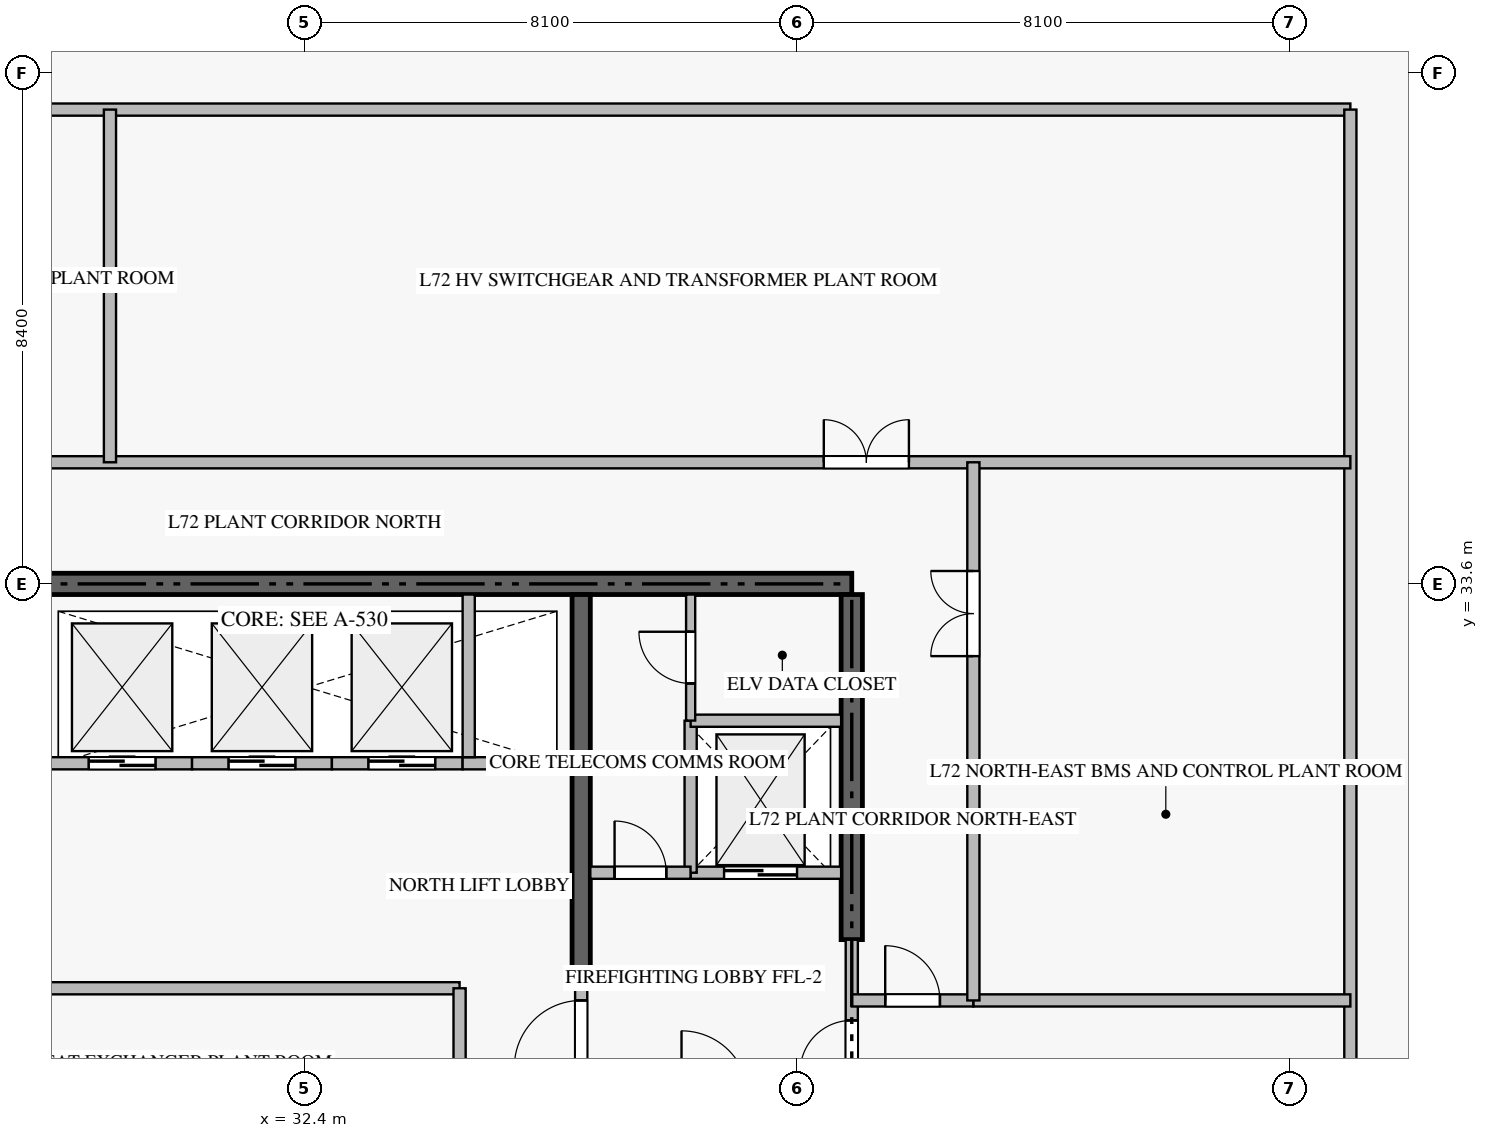
"""IFC4 building model, lengths in metres.
Left out: names, types, materials, properties, quantities, classifications, styles, units other than length and angle.
Written with IfcOpenShell. Run it as: python <this file> out.ifc"""

import sys

from ifc_helpers import new_model, si_unit, direction, frame, frame_2d, origin, place, context, subcontext, project, spatial, rectangle, extrude, source, transform, mapped, element, fill, save


model = new_model("IFC4")
c1 = context("Model", 3, precision=1e-05, world=origin(), true_north=direction((0.0, 1.0)))
c2 = subcontext(c1, "Body", "Model", "MODEL_VIEW")
j1 = project(units=[si_unit("LENGTHUNIT", "METRE"), si_unit("PLANEANGLEUNIT", "RADIAN")], contexts=[c1])
p1 = place(None, origin())
s1 = spatial("IfcSite", under=j1, at=p1, CompositionType="ELEMENT")
p2 = place(p1, origin())
s2 = spatial("IfcBuilding", under=s1, at=p2, CompositionType="ELEMENT")
p3 = place(p2, frame((0.0, 0.0, 287.45)))
s3 = spatial("IfcBuildingStorey", under=s2, at=p3, CompositionType="ELEMENT", Elevation=287.45)
p4 = place(p3, frame((41.4, 33.6, -0.44), z_axis=(0.0, 0.0, 1.0), x_axis=(-1.0, 0.0, 0.0)))
e1 = element("IfcWall", 1, at=p4, inside=s3, PredefinedType="SHEAR", context=c2, shape_type="SweptSolid", body=[
    extrude(rectangle(XDim=18.0, YDim=0.35, at=frame_2d((9.0, 0.0))), origin(), (0.0, 0.0, 1.0), 6.178),
])
p5 = place(p3, frame((41.4, 27.75, -0.44), z_axis=(0.0, 0.0, 1.0), x_axis=(0.0, 1.0, 0.0)))
e2 = element("IfcWall", 2, at=p5, inside=s3, PredefinedType="SHEAR", context=c2, shape_type="SweptSolid", body=[
    extrude(rectangle(XDim=5.675, YDim=0.35, at=frame_2d((2.837, 0.0))), origin(), (0.0, 0.0, 1.0), 6.178),
])
p6 = place(p3, frame((36.95, 27.05, -0.44), z_axis=(0.0, 0.0, 1.0), x_axis=(0.0, 1.0, 0.0)))
e3 = element("IfcWall", 3, at=p6, inside=s3, PredefinedType="SHEAR", context=c2, shape_type="SweptSolid", body=[
    extrude(rectangle(XDim=6.375, YDim=0.3, at=frame_2d((3.188, 0.0))), origin(), (0.0, 0.0, 1.0), 6.178),
])
p7 = place(p3, frame((38.75, 28.85, 0.0), z_axis=(0.0, 0.0, 1.0), x_axis=(1.0, 0.0, 0.0)))
e4 = element("IfcWall", 4, at=p7, inside=s3, PredefinedType="STANDARD", context=c2, shape_type="SweptSolid", body=[
    extrude(rectangle(XDim=2.475, YDim=0.2, at=frame_2d((1.238, 0.0))), origin(), (0.0, 0.0, 1.0), 5.74),
])
p8 = place(p7, frame((0.55, 0.0, 0.0)))
e5 = element("IfcOpeningElement", 5, at=p8, cuts=e4, PredefinedType="OPENING", context=c2, shape_type="SweptSolid", body=[
    extrude(rectangle(XDim=1.2, YDim=2.2, at=frame_2d((0.6, 1.1))), frame((0.0, 0.11, 0.0), z_axis=(0.0, -1.0, 0.0), x_axis=(1.0, 0.0, 0.0)), (0.0, 0.0, 1.0), 0.22),
])
p9 = place(p3, frame((28.0, 30.65, 0.0), z_axis=(0.0, 0.0, 1.0), x_axis=(1.0, 0.0, 0.0)))
e6 = element("IfcWall", 6, at=p9, inside=s3, PredefinedType="STANDARD", context=c2, shape_type="SweptSolid", body=[
    extrude(rectangle(XDim=2.55, YDim=0.2, at=frame_2d((1.275, 0.0))), origin(), (0.0, 0.0, 1.0), 5.74),
])
p10 = place(p9, frame((0.85, 0.0, 0.0)))
e7 = element("IfcOpeningElement", 7, at=p10, cuts=e6, PredefinedType="OPENING", context=c2, shape_type="SweptSolid", body=[
    extrude(rectangle(XDim=1.1, YDim=2.2, at=frame_2d((0.55, 1.1))), frame((0.0, 0.11, 0.0), z_axis=(0.0, -1.0, 0.0), x_axis=(1.0, 0.0, 0.0)), (0.0, 0.0, 1.0), 0.22),
])
p11 = place(p3, frame((30.55, 30.65, 0.0), z_axis=(0.0, 0.0, 1.0), x_axis=(1.0, 0.0, 0.0)))
e8 = element("IfcWall", 8, at=p11, inside=s3, PredefinedType="STANDARD", context=c2, shape_type="SweptSolid", body=[
    extrude(rectangle(XDim=2.3, YDim=0.2, at=frame_2d((1.15, 0.0))), origin(), (0.0, 0.0, 1.0), 5.74),
])
p12 = place(p11, frame((0.6, 0.0, 0.0)))
e9 = element("IfcOpeningElement", 9, at=p12, cuts=e8, PredefinedType="OPENING", context=c2, shape_type="SweptSolid", body=[
    extrude(rectangle(XDim=1.1, YDim=2.2, at=frame_2d((0.55, 1.1))), frame((0.0, 0.11, 0.0), z_axis=(0.0, -1.0, 0.0), x_axis=(1.0, 0.0, 0.0)), (0.0, 0.0, 1.0), 0.22),
])
p13 = place(p3, frame((32.85, 30.65, 0.0), z_axis=(0.0, 0.0, 1.0), x_axis=(1.0, 0.0, 0.0)))
e10 = element("IfcWall", 10, at=p13, inside=s3, PredefinedType="STANDARD", context=c2, shape_type="SweptSolid", body=[
    extrude(rectangle(XDim=2.15, YDim=0.2, at=frame_2d((1.075, 0.0))), origin(), (0.0, 0.0, 1.0), 5.74),
])
p14 = place(p13, frame((0.6, 0.0, 0.0)))
e11 = element("IfcOpeningElement", 11, at=p14, cuts=e10, PredefinedType="OPENING", context=c2, shape_type="SweptSolid", body=[
    extrude(rectangle(XDim=1.1, YDim=2.2, at=frame_2d((0.55, 1.1))), frame((0.0, 0.11, 0.0), z_axis=(0.0, -1.0, 0.0), x_axis=(1.0, 0.0, 0.0)), (0.0, 0.0, 1.0), 0.22),
])
p15 = place(p3, frame((35.0, 30.65, 0.0), z_axis=(0.0, 0.0, 1.0), x_axis=(1.0, 0.0, 0.0)))
e12 = element("IfcWall", 12, at=p15, inside=s3, PredefinedType="STANDARD", context=c2, shape_type="SweptSolid", body=[
    extrude(rectangle(XDim=1.8, YDim=0.2, at=frame_2d((0.9, 0.0))), origin(), (0.0, 0.0, 1.0), 5.74),
])
p16 = place(p3, frame((35.1, 30.75, 0.0), z_axis=(0.0, 0.0, 1.0), x_axis=(0.0, 1.0, 0.0)))
e13 = element("IfcWall", 13, at=p16, inside=s3, PredefinedType="STANDARD", context=c2, shape_type="SweptSolid", body=[
    extrude(rectangle(XDim=2.675, YDim=0.2, at=frame_2d((1.337, 0.0))), origin(), (0.0, 0.0, 1.0), 5.74),
])
p17 = place(p3, frame((38.75, 28.85, 0.0), z_axis=(0.0, 0.0, 1.0), x_axis=(0.0, 1.0, 0.0)))
e14 = element("IfcWall", 14, at=p17, inside=s3, PredefinedType="STANDARD", context=c2, shape_type="SweptSolid", body=[
    extrude(rectangle(XDim=2.5, YDim=0.2, at=frame_2d((1.25, 0.0))), origin(), (0.0, 0.0, 1.0), 5.74),
])
p18 = place(p3, frame((38.75, 31.35, 0.0), z_axis=(0.0, 0.0, 1.0), x_axis=(1.0, 0.0, 0.0)))
e15 = element("IfcWall", 15, at=p18, inside=s3, PredefinedType="STANDARD", context=c2, shape_type="SweptSolid", body=[
    extrude(rectangle(XDim=2.475, YDim=0.2, at=frame_2d((1.238, 0.0))), origin(), (0.0, 0.0, 1.0), 5.74),
])
p19 = place(p3, frame((37.1, 28.85, 0.0), z_axis=(0.0, 0.0, 1.0), x_axis=(1.0, 0.0, 0.0)))
e16 = element("IfcWall", 16, at=p19, inside=s3, PredefinedType="STANDARD", context=c2, shape_type="SweptSolid", body=[
    extrude(rectangle(XDim=1.648, YDim=0.2, at=frame_2d((0.824, 0.0))), origin(), (0.0, 0.0, 1.0), 5.74),
])
p20 = place(p19, frame((0.399, 0.0, 0.0)))
e17 = element("IfcOpeningElement", 17, at=p20, cuts=e16, PredefinedType="OPENING", context=c2, shape_type="SweptSolid", body=[
    extrude(rectangle(XDim=0.85, YDim=2.1, at=frame_2d((0.425, 1.05))), frame((0.0, 0.11, 0.0), z_axis=(0.0, -1.0, 0.0), x_axis=(1.0, 0.0, 0.0)), (0.0, 0.0, 1.0), 0.22),
])
p21 = place(p3, frame((41.4, 25.352, 0.0), z_axis=(0.0, 0.0, 1.0), x_axis=(0.0, 1.0, 0.0)))
e18 = element("IfcWall", 18, at=p21, inside=s3, PredefinedType="STANDARD", context=c2, shape_type="SweptSolid", body=[
    extrude(rectangle(XDim=2.396, YDim=0.2, at=frame_2d((1.198, 0.0))), origin(), (0.0, 0.0, 1.0), 5.74),
])
p22 = place(p21, frame((0.22, 0.0, 0.0)))
e19 = element("IfcOpeningElement", 19, at=p22, cuts=e18, PredefinedType="OPENING", context=c2, shape_type="SweptSolid", body=[
    extrude(rectangle(XDim=0.85, YDim=2.1, at=frame_2d((0.425, 1.05))), frame((0.0, 0.11, 0.0), z_axis=(0.0, -1.0, 0.0), x_axis=(1.0, 0.0, 0.0)), (0.0, 0.0, 1.0), 0.22),
])
p23 = place(p3, frame((36.95, 25.352, 0.0), z_axis=(0.0, 0.0, 1.0), x_axis=(0.0, 1.0, 0.0)))
e20 = element("IfcWall", 20, at=p23, inside=s3, PredefinedType="STANDARD", context=c2, shape_type="SweptSolid", body=[
    extrude(rectangle(XDim=1.696, YDim=0.2, at=frame_2d((0.848, 0.0))), origin(), (0.0, 0.0, 1.0), 5.74),
])
p24 = place(p23, frame((0.298, 0.0, 0.0)))
e21 = element("IfcOpeningElement", 21, at=p24, cuts=e20, PredefinedType="OPENING", context=c2, shape_type="SweptSolid", body=[
    extrude(rectangle(XDim=1.1, YDim=2.15, at=frame_2d((0.55, 1.075))), frame((0.0, 0.11, 0.0), z_axis=(0.0, -1.0, 0.0), x_axis=(1.0, 0.0, 0.0)), (0.0, 0.0, 1.0), 0.22),
])
p25 = place(p3, frame((38.75, 31.352, 0.0), z_axis=(0.0, 0.0, 1.0), x_axis=(0.0, 1.0, 0.0)))
e22 = element("IfcWall", 22, at=p25, inside=s3, PredefinedType="PARTITIONING", context=c2, shape_type="SweptSolid", body=[
    extrude(rectangle(XDim=2.073, YDim=0.15, at=frame_2d((1.037, 0.0))), origin(), (0.0, 0.0, 1.0), 5.74),
])
p26 = place(p25, frame((0.611, 0.0, 0.0)))
e23 = element("IfcOpeningElement", 23, at=p26, cuts=e22, PredefinedType="OPENING", context=c2, shape_type="SweptSolid", body=[
    extrude(rectangle(XDim=0.85, YDim=2.1, at=frame_2d((0.425, 1.05))), frame((0.0, 0.085, 0.0), z_axis=(0.0, -1.0, 0.0), x_axis=(1.0, 0.0, 0.0)), (0.0, 0.0, 1.0), 0.17),
])
p27 = place(p3, frame((28.0, 26.95, 0.0), z_axis=(0.0, 0.0, 1.0), x_axis=(1.0, 0.0, 0.0)))
e24 = element("IfcWall", 24, at=p27, inside=s3, PredefinedType="STANDARD", context=c2, shape_type="SweptSolid", body=[
    extrude(rectangle(XDim=6.95, YDim=0.2, at=frame_2d((3.475, 0.0))), origin(), (0.0, 0.0, 1.0), 5.74),
])
p28 = place(p3, frame((34.95, 24.15, 0.0), z_axis=(0.0, 0.0, 1.0), x_axis=(0.0, 1.0, 0.0)))
e25 = element("IfcWall", 25, at=p28, inside=s3, PredefinedType="STANDARD", context=c2, shape_type="SweptSolid", body=[
    extrude(rectangle(XDim=2.8, YDim=0.2, at=frame_2d((1.4, 0.0))), origin(), (0.0, 0.0, 1.0), 5.74),
])
p29 = place(p3, frame((15.2, 41.4, 0.0), z_axis=(0.0, 0.0, 1.0), x_axis=(1.0, 0.0, 0.0)))
e26 = element("IfcWall", 26, at=p29, inside=s3, PredefinedType="STANDARD", context=c2, shape_type="SweptSolid", body=[
    extrude(rectangle(XDim=34.4, YDim=0.2, at=frame_2d((17.2, 0.0))), origin(), (0.0, 0.0, 1.0), 5.74),
])
p30 = place(p3, frame((49.6, 9.0, 0.0), z_axis=(0.0, 0.0, 1.0), x_axis=(0.0, 1.0, 0.0)))
e27 = element("IfcWall", 27, at=p30, inside=s3, PredefinedType="STANDARD", context=c2, shape_type="SweptSolid", body=[
    extrude(rectangle(XDim=32.4, YDim=0.2, at=frame_2d((16.2, 0.0))), origin(), (0.0, 0.0, 1.0), 5.74),
])
p31 = place(p3, frame((41.4, 26.75, 0.0), z_axis=(0.0, 0.0, 1.0), x_axis=(1.0, 0.0, 0.0)))
e28 = element("IfcWall", 28, at=p31, inside=s3, PredefinedType="STANDARD", context=c2, shape_type="SweptSolid", body=[
    extrude(rectangle(XDim=2.0, YDim=0.2, at=frame_2d((1.0, 0.0))), origin(), (0.0, 0.0, 1.0), 5.74),
])
p32 = place(p31, frame((0.55, 0.0, 0.0)))
e29 = element("IfcOpeningElement", 29, at=p32, cuts=e28, PredefinedType="OPENING", context=c2, shape_type="SweptSolid", body=[
    extrude(rectangle(XDim=0.9, YDim=2.1, at=frame_2d((0.45, 1.05))), frame((0.0, 0.11, 0.0), z_axis=(0.0, -1.0, 0.0), x_axis=(1.0, 0.0, 0.0)), (0.0, 0.0, 1.0), 0.22),
])
p33 = place(p3, frame((43.402, 26.75, 0.0), z_axis=(0.0, 0.0, 1.0), x_axis=(1.0, 0.0, 0.0)))
e30 = element("IfcWall", 30, at=p33, inside=s3, PredefinedType="STANDARD", context=c2, shape_type="SweptSolid", body=[
    extrude(rectangle(XDim=6.198, YDim=0.2, at=frame_2d((3.099, 0.0))), origin(), (0.0, 0.0, 1.0), 5.74),
])
p34 = place(p3, frame((15.2, 35.6, 0.0), z_axis=(0.0, 0.0, 1.0), x_axis=(1.0, 0.0, 0.0)))
e31 = element("IfcWall", 31, at=p34, inside=s3, PredefinedType="STANDARD", context=c2, shape_type="SweptSolid", body=[
    extrude(rectangle(XDim=34.4, YDim=0.2, at=frame_2d((17.2, 0.0))), origin(), (0.0, 0.0, 1.0), 5.74),
])
p35 = place(p34, frame((7.26, 0.0, 0.0)))
e32 = element("IfcOpeningElement", 32, at=p35, cuts=e31, PredefinedType="OPENING", context=c2, shape_type="SweptSolid", body=[
    extrude(rectangle(XDim=1.4, YDim=2.2, at=frame_2d((0.7, 1.1))), frame((0.0, 0.11, 0.0), z_axis=(0.0, -1.0, 0.0), x_axis=(1.0, 0.0, 0.0)), (0.0, 0.0, 1.0), 0.22),
])
p36 = place(p34, frame((25.74, 0.0, 0.0)))
e33 = element("IfcOpeningElement", 33, at=p36, cuts=e31, PredefinedType="OPENING", context=c2, shape_type="SweptSolid", body=[
    extrude(rectangle(XDim=1.4, YDim=2.2, at=frame_2d((0.7, 1.1))), frame((0.0, 0.11, 0.0), z_axis=(0.0, -1.0, 0.0), x_axis=(1.0, 0.0, 0.0)), (0.0, 0.0, 1.0), 0.22),
])
p37 = place(p3, frame((29.2, 35.6, 0.0), z_axis=(0.0, 0.0, 1.0), x_axis=(0.0, 1.0, 0.0)))
e34 = element("IfcWall", 34, at=p37, inside=s3, PredefinedType="STANDARD", context=c2, shape_type="SweptSolid", body=[
    extrude(rectangle(XDim=5.8, YDim=0.2, at=frame_2d((2.9, 0.0))), origin(), (0.0, 0.0, 1.0), 5.74),
])
p38 = place(p3, frame((43.4, 26.75, 0.0), z_axis=(0.0, 0.0, 1.0), x_axis=(0.0, 1.0, 0.0)))
e35 = element("IfcWall", 35, at=p38, inside=s3, PredefinedType="STANDARD", context=c2, shape_type="SweptSolid", body=[
    extrude(rectangle(XDim=8.85, YDim=0.2, at=frame_2d((4.425, 0.0))), origin(), (0.0, 0.0, 1.0), 5.74),
])
p39 = place(p38, frame((5.662, 0.0, 0.0)))
e36 = element("IfcOpeningElement", 36, at=p39, cuts=e35, PredefinedType="OPENING", context=c2, shape_type="SweptSolid", body=[
    extrude(rectangle(XDim=1.4, YDim=2.2, at=frame_2d((0.7, 1.1))), frame((0.0, 0.11, 0.0), z_axis=(0.0, -1.0, 0.0), x_axis=(1.0, 0.0, 0.0)), (0.0, 0.0, 1.0), 0.22),
])
m1 = source(origin(), c2, "Body", "SweptSolid", [
    extrude(rectangle(XDim=1.2, YDim=2.2, at=frame_2d((0.6, 1.1))), frame((0.0, 0.025, 0.0), z_axis=(0.0, -1.0, 0.0), x_axis=(1.0, 0.0, 0.0)), (0.0, 0.0, 1.0), 0.05),
])
p40 = place(p8, origin())
e37 = element("IfcDoor", 37, at=p40, inside=s3, OperationType="DOUBLE_DOOR_SLIDING", PredefinedType="DOOR", context=c2, shape_type="MappedRepresentation", body=[
    mapped(m1, transform((0.0, 0.0, 0.0), scale=1.0)),
])
fill(e5, e37)
m2 = source(origin(), c2, "Body", "SweptSolid", [
    extrude(rectangle(XDim=1.1, YDim=2.2, at=frame_2d((0.55, 1.1))), frame((0.0, 0.025, 0.0), z_axis=(0.0, -1.0, 0.0), x_axis=(1.0, 0.0, 0.0)), (0.0, 0.0, 1.0), 0.05),
])
p41 = place(p10, origin())
e38 = element("IfcDoor", 38, at=p41, inside=s3, OperationType="DOUBLE_DOOR_SLIDING", PredefinedType="DOOR", context=c2, shape_type="MappedRepresentation", body=[
    mapped(m2, transform((0.0, 0.0, 0.0), scale=1.0)),
])
fill(e7, e38)
p42 = place(p12, origin())
e39 = element("IfcDoor", 39, at=p42, inside=s3, OperationType="DOUBLE_DOOR_SLIDING", PredefinedType="DOOR", context=c2, shape_type="MappedRepresentation", body=[
    mapped(m2, transform((0.0, 0.0, 0.0), scale=1.0)),
])
fill(e9, e39)
p43 = place(p14, origin())
e40 = element("IfcDoor", 40, at=p43, inside=s3, OperationType="DOUBLE_DOOR_SLIDING", PredefinedType="DOOR", context=c2, shape_type="MappedRepresentation", body=[
    mapped(m2, transform((0.0, 0.0, 0.0), scale=1.0)),
])
fill(e11, e40)
m3 = source(origin(), c2, "Body", "SweptSolid", [
    extrude(rectangle(XDim=0.85, YDim=2.1, at=frame_2d((0.425, 1.05))), frame((0.0, 0.025, 0.0), z_axis=(0.0, -1.0, 0.0), x_axis=(1.0, 0.0, 0.0)), (0.0, 0.0, 1.0), 0.05),
])
p44 = place(p20, origin())
e41 = element("IfcDoor", 41, at=p44, inside=s3, OperationType="SINGLE_SWING_LEFT", PredefinedType="DOOR", context=c2, shape_type="MappedRepresentation", body=[
    mapped(m3, transform((0.0, 0.0, 0.0), scale=1.0)),
])
fill(e17, e41)
p45 = place(p22, origin())
e42 = element("IfcDoor", 42, at=p45, inside=s3, OperationType="SINGLE_SWING_LEFT", PredefinedType="DOOR", context=c2, shape_type="MappedRepresentation", body=[
    mapped(m3, transform((0.0, 0.0, 0.0), scale=1.0)),
])
fill(e19, e42)
m4 = source(origin(), c2, "Body", "SweptSolid", [
    extrude(rectangle(XDim=1.1, YDim=2.15, at=frame_2d((0.55, 1.075))), frame((0.0, 0.025, 0.0), z_axis=(0.0, -1.0, 0.0), x_axis=(1.0, 0.0, 0.0)), (0.0, 0.0, 1.0), 0.05),
])
p46 = place(p24, origin())
e43 = element("IfcDoor", 43, at=p46, inside=s3, OperationType="SINGLE_SWING_LEFT", PredefinedType="DOOR", context=c2, shape_type="MappedRepresentation", body=[
    mapped(m4, transform((0.0, 0.0, 0.0), scale=1.0)),
])
fill(e21, e43)
p47 = place(p26, origin())
e44 = element("IfcDoor", 44, at=p47, inside=s3, OperationType="SINGLE_SWING_RIGHT", PredefinedType="DOOR", context=c2, shape_type="MappedRepresentation", body=[
    mapped(m3, transform((0.0, 0.0, 0.0), scale=1.0)),
])
fill(e23, e44)
m5 = source(origin(), c2, "Body", "SweptSolid", [
    extrude(rectangle(XDim=0.9, YDim=2.1, at=frame_2d((0.45, 1.05))), frame((0.0, 0.025, 0.0), z_axis=(0.0, -1.0, 0.0), x_axis=(1.0, 0.0, 0.0)), (0.0, 0.0, 1.0), 0.05),
])
p48 = place(p32, origin())
e45 = element("IfcDoor", 45, at=p48, inside=s3, OperationType="SINGLE_SWING_LEFT", PredefinedType="DOOR", context=c2, shape_type="MappedRepresentation", body=[
    mapped(m5, transform((0.0, 0.0, 0.0), scale=1.0)),
])
fill(e29, e45)
m6 = source(origin(), c2, "Body", "SweptSolid", [
    extrude(rectangle(XDim=1.4, YDim=2.2, at=frame_2d((0.7, 1.1))), frame((0.0, 0.025, 0.0), z_axis=(0.0, -1.0, 0.0), x_axis=(1.0, 0.0, 0.0)), (0.0, 0.0, 1.0), 0.05),
])
p49 = place(p36, origin())
e46 = element("IfcDoor", 46, at=p49, inside=s3, OperationType="DOUBLE_DOOR_SINGLE_SWING", PredefinedType="DOOR", context=c2, shape_type="MappedRepresentation", body=[
    mapped(m6, transform((0.0, 0.0, 0.0), scale=1.0)),
])
fill(e33, e46)
p50 = place(p39, origin())
e47 = element("IfcDoor", 47, at=p50, inside=s3, OperationType="DOUBLE_DOOR_SINGLE_SWING", PredefinedType="DOOR", context=c2, shape_type="MappedRepresentation", body=[
    mapped(m6, transform((0.0, 0.0, 0.0), scale=1.0)),
])
fill(e36, e47)
save(model, sys.argv[1])
